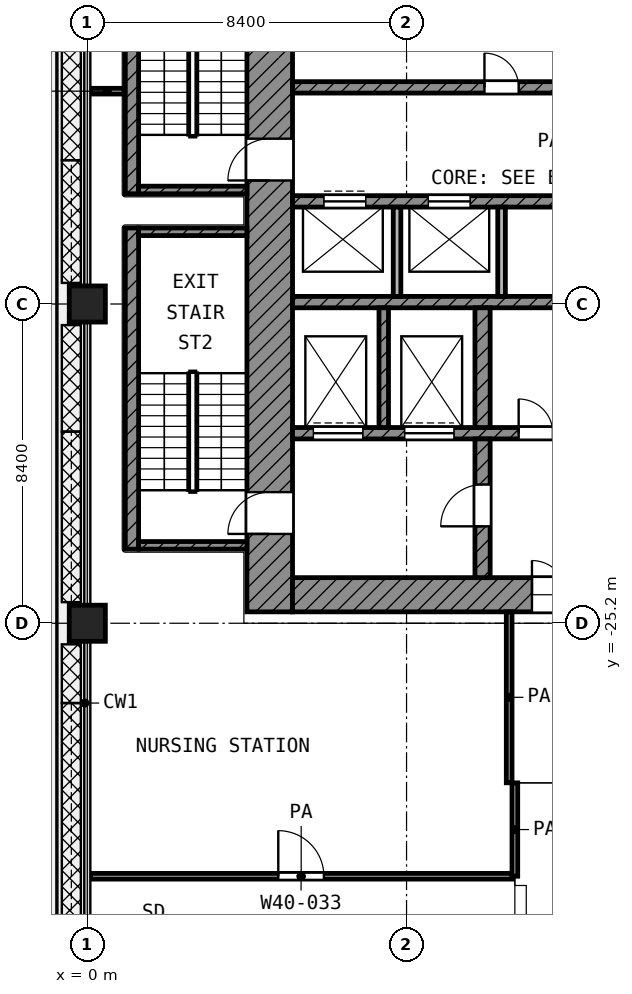
"""IFC4 building model, lengths in metres.
Left out: names, types, materials, properties, quantities, classifications, styles, units other than length and angle.
Written with IfcOpenShell. Run it as: python <this file> out.ifc"""

import sys

from ifc_helpers import new_model, si_unit, direction, frame, frame_2d, origin, origin_2d, place, context, subcontext, project, spatial, rectangle, extrude, element, fill, save


model = new_model("IFC4")
c1 = context("Model", 3, precision=1e-05, world=origin(), true_north=direction((0.0, 1.0)))
c2 = subcontext(c1, "Body", "Model", "MODEL_VIEW")
j1 = project(units=[si_unit("LENGTHUNIT", "METRE"), si_unit("PLANEANGLEUNIT", "RADIAN")], contexts=[c1])
p1 = place(None, origin())
s1 = spatial("IfcSite", under=j1, at=p1, CompositionType="ELEMENT")
p2 = place(p1, origin())
s2 = spatial("IfcBuilding", under=s1, at=p2, CompositionType="ELEMENT")
p3 = place(p2, frame((0.0, 0.0, 196.2)))
s3 = spatial("IfcBuildingStorey", under=s2, at=p3, CompositionType="ELEMENT", Elevation=196.2)
for number, where, z_axis, x_axis in (
    (1, (0.0, -16.8, 0.0), (0.0, 0.0, 1.0), (1.0, 0.0, 0.0)),
    (2, (0.0, -25.2, 0.0), (0.0, 0.0, 1.0), (1.0, 0.0, 0.0)),
):
    element("IfcColumn", number, at=place(p3, frame(where, z_axis=z_axis, x_axis=x_axis)), inside=s3, PredefinedType="COLUMN", context=c2, shape_type="SweptSolid", body=[
        extrude(rectangle(XDim=0.95, YDim=0.95, at=origin_2d()), origin(), (0.0, 0.0, 1.0), 4.2),
    ])
p4 = place(p3, frame((4.8, -24.9, 0.0), z_axis=(0.0, 0.0, 1.0), x_axis=(0.0, 1.0, 0.0)))
e3 = element("IfcWall", 3, at=p4, inside=s3, PredefinedType="SHEAR", context=c2, shape_type="SweptSolid", body=[
    extrude(rectangle(XDim=19.5, YDim=1.2, at=frame_2d((9.75, 0.0))), origin(), (0.0, 0.0, 1.0), 3.6),
])
p5 = place(p4, frame((11.35, 0.0, 0.0)))
e4 = element("IfcOpeningElement", 4, at=p5, cuts=e3, PredefinedType="OPENING", context=c2, shape_type="SweptSolid", body=[
    extrude(rectangle(XDim=1.1, YDim=2.1, at=frame_2d((0.55, 1.05))), frame((0.0, 0.61, 0.0), z_axis=(0.0, -1.0, 0.0), x_axis=(1.0, 0.0, 0.0)), (0.0, 0.0, 1.0), 1.22),
])
p6 = place(p4, frame((2.05, 0.0, 0.0)))
e5 = element("IfcOpeningElement", 5, at=p6, cuts=e3, PredefinedType="OPENING", context=c2, shape_type="SweptSolid", body=[
    extrude(rectangle(XDim=1.1, YDim=2.1, at=frame_2d((0.55, 1.05))), frame((0.0, 0.61, 0.0), z_axis=(0.0, -1.0, 0.0), x_axis=(1.0, 0.0, 0.0)), (0.0, 0.0, 1.0), 1.22),
])
p7 = place(p3, frame((5.4, -24.45, 0.0), z_axis=(0.0, 0.0, 1.0), x_axis=(1.0, 0.0, 0.0)))
e6 = element("IfcWall", 6, at=p7, inside=s3, PredefinedType="SHEAR", context=c2, shape_type="SweptSolid", body=[
    extrude(rectangle(XDim=18.6, YDim=0.9, at=frame_2d((9.3, 0.0))), origin(), (0.0, 0.0, 1.0), 3.6),
])
p8 = place(p7, frame((6.3, 0.0, 0.0)))
e7 = element("IfcOpeningElement", 7, at=p8, cuts=e6, PredefinedType="OPENING", context=c2, shape_type="SweptSolid", body=[
    extrude(rectangle(XDim=1.8, YDim=2.1, at=frame_2d((0.9, 1.05))), frame((0.0, 0.46, 0.0), z_axis=(0.0, -1.0, 0.0), x_axis=(1.0, 0.0, 0.0)), (0.0, 0.0, 1.0), 0.92),
])
p9 = place(p3, frame((5.4, -11.1, 0.0), z_axis=(0.0, 0.0, 1.0), x_axis=(1.0, 0.0, 0.0)))
e8 = element("IfcWall", 8, at=p9, inside=s3, PredefinedType="SHEAR", context=c2, shape_type="SweptSolid", body=[
    extrude(rectangle(XDim=16.65, YDim=0.3, at=frame_2d((8.325, 0.0))), origin(), (0.0, 0.0, 1.0), 3.6),
])
p10 = place(p9, frame((11.825, 0.0, 0.0)))
e9 = element("IfcOpeningElement", 9, at=p10, cuts=e8, PredefinedType="OPENING", context=c2, shape_type="SweptSolid", body=[
    extrude(rectangle(XDim=1.1, YDim=2.1, at=frame_2d((0.55, 1.05))), frame((0.0, 0.16, 0.0), z_axis=(0.0, -1.0, 0.0), x_axis=(1.0, 0.0, 0.0)), (0.0, 0.0, 1.0), 0.32),
])
p11 = place(p9, frame((14.575, 0.0, 0.0)))
e10 = element("IfcOpeningElement", 10, at=p11, cuts=e8, PredefinedType="OPENING", context=c2, shape_type="SweptSolid", body=[
    extrude(rectangle(XDim=1.1, YDim=2.1, at=frame_2d((0.55, 1.05))), frame((0.0, 0.16, 0.0), z_axis=(0.0, -1.0, 0.0), x_axis=(1.0, 0.0, 0.0)), (0.0, 0.0, 1.0), 0.32),
])
p12 = place(p9, frame((5.05, 0.0, 0.0)))
e11 = element("IfcOpeningElement", 11, at=p12, cuts=e8, PredefinedType="OPENING", context=c2, shape_type="SweptSolid", body=[
    extrude(rectangle(XDim=0.9, YDim=2.1, at=frame_2d((0.45, 1.05))), frame((0.0, 0.16, 0.0), z_axis=(0.0, -1.0, 0.0), x_axis=(1.0, 0.0, 0.0)), (0.0, 0.0, 1.0), 0.32),
])
p13 = place(p3, frame((5.4, -14.1, 0.0), z_axis=(0.0, 0.0, 1.0), x_axis=(1.0, 0.0, 0.0)))
e12 = element("IfcWall", 12, at=p13, inside=s3, PredefinedType="SHEAR", context=c2, shape_type="SweptSolid", body=[
    extrude(rectangle(XDim=16.65, YDim=0.3, at=frame_2d((8.325, 0.0))), origin(), (0.0, 0.0, 1.0), 3.6),
])
p14 = place(p13, frame((0.825, 0.0, 0.0)))
e13 = element("IfcOpeningElement", 13, at=p14, cuts=e12, PredefinedType="OPENING", context=c2, shape_type="SweptSolid", body=[
    extrude(rectangle(XDim=1.1, YDim=2.1, at=frame_2d((0.55, 1.05))), frame((0.0, 0.16, 0.0), z_axis=(0.0, -1.0, 0.0), x_axis=(1.0, 0.0, 0.0)), (0.0, 0.0, 1.0), 0.32),
])
p15 = place(p13, frame((3.575, 0.0, 0.0)))
e14 = element("IfcOpeningElement", 14, at=p15, cuts=e12, PredefinedType="OPENING", context=c2, shape_type="SweptSolid", body=[
    extrude(rectangle(XDim=1.1, YDim=2.1, at=frame_2d((0.55, 1.05))), frame((0.0, 0.16, 0.0), z_axis=(0.0, -1.0, 0.0), x_axis=(1.0, 0.0, 0.0)), (0.0, 0.0, 1.0), 0.32),
])
p16 = place(p3, frame((5.4, -16.75, 0.0), z_axis=(0.0, 0.0, 1.0), x_axis=(1.0, 0.0, 0.0)))
e15 = element("IfcWall", 15, at=p16, inside=s3, PredefinedType="SHEAR", context=c2, shape_type="SweptSolid", body=[
    extrude(rectangle(XDim=16.65, YDim=0.3, at=frame_2d((8.325, 0.0))), origin(), (0.0, 0.0, 1.0), 3.6),
])
p17 = place(p3, frame((5.4, -20.2, 0.0), z_axis=(0.0, 0.0, 1.0), x_axis=(1.0, 0.0, 0.0)))
e16 = element("IfcWall", 16, at=p17, inside=s3, PredefinedType="SHEAR", context=c2, shape_type="SweptSolid", body=[
    extrude(rectangle(XDim=14.65, YDim=0.3, at=frame_2d((7.325, 0.0))), origin(), (0.0, 0.0, 1.0), 3.6),
])
p18 = place(p17, frame((10.55, 0.0, 0.0)))
e17 = element("IfcOpeningElement", 17, at=p18, cuts=e16, PredefinedType="OPENING", context=c2, shape_type="SweptSolid", body=[
    extrude(rectangle(XDim=1.3, YDim=2.1, at=frame_2d((0.65, 1.05))), frame((0.0, 0.16, 0.0), z_axis=(0.0, -1.0, 0.0), x_axis=(1.0, 0.0, 0.0)), (0.0, 0.0, 1.0), 0.32),
])
p19 = place(p17, frame((12.95, 0.0, 0.0)))
e18 = element("IfcOpeningElement", 18, at=p19, cuts=e16, PredefinedType="OPENING", context=c2, shape_type="SweptSolid", body=[
    extrude(rectangle(XDim=1.3, YDim=2.1, at=frame_2d((0.65, 1.05))), frame((0.0, 0.16, 0.0), z_axis=(0.0, -1.0, 0.0), x_axis=(1.0, 0.0, 0.0)), (0.0, 0.0, 1.0), 0.32),
])
p20 = place(p17, frame((0.55, 0.0, 0.0)))
e19 = element("IfcOpeningElement", 19, at=p20, cuts=e16, PredefinedType="OPENING", context=c2, shape_type="SweptSolid", body=[
    extrude(rectangle(XDim=1.3, YDim=2.1, at=frame_2d((0.65, 1.05))), frame((0.0, 0.16, 0.0), z_axis=(0.0, -1.0, 0.0), x_axis=(1.0, 0.0, 0.0)), (0.0, 0.0, 1.0), 0.32),
])
p21 = place(p17, frame((2.95, 0.0, 0.0)))
e20 = element("IfcOpeningElement", 20, at=p21, cuts=e16, PredefinedType="OPENING", context=c2, shape_type="SweptSolid", body=[
    extrude(rectangle(XDim=1.3, YDim=2.1, at=frame_2d((0.65, 1.05))), frame((0.0, 0.16, 0.0), z_axis=(0.0, -1.0, 0.0), x_axis=(1.0, 0.0, 0.0)), (0.0, 0.0, 1.0), 0.32),
])
p22 = place(p17, frame((5.95, 0.0, 0.0)))
e21 = element("IfcOpeningElement", 21, at=p22, cuts=e16, PredefinedType="OPENING", context=c2, shape_type="SweptSolid", body=[
    extrude(rectangle(XDim=0.9, YDim=2.1, at=frame_2d((0.45, 1.05))), frame((0.0, 0.16, 0.0), z_axis=(0.0, -1.0, 0.0), x_axis=(1.0, 0.0, 0.0)), (0.0, 0.0, 1.0), 0.32),
])
p23 = place(p17, frame((8.35, 0.0, 0.0)))
e22 = element("IfcOpeningElement", 22, at=p23, cuts=e16, PredefinedType="OPENING", context=c2, shape_type="SweptSolid", body=[
    extrude(rectangle(XDim=0.9, YDim=2.1, at=frame_2d((0.45, 1.05))), frame((0.0, 0.16, 0.0), z_axis=(0.0, -1.0, 0.0), x_axis=(1.0, 0.0, 0.0)), (0.0, 0.0, 1.0), 0.32),
])
p24 = place(p3, frame((10.4, -24.0, 0.0), z_axis=(0.0, 0.0, 1.0), x_axis=(0.0, 1.0, 0.0)))
e23 = element("IfcWall", 23, at=p24, inside=s3, PredefinedType="SHEAR", context=c2, shape_type="SweptSolid", body=[
    extrude(rectangle(XDim=3.65, YDim=0.4, at=frame_2d((1.825, 0.0))), origin(), (0.0, 0.0, 1.0), 3.6),
])
p25 = place(p24, frame((1.35, 0.0, 0.0)))
e24 = element("IfcOpeningElement", 24, at=p25, cuts=e23, PredefinedType="OPENING", context=c2, shape_type="SweptSolid", body=[
    extrude(rectangle(XDim=1.1, YDim=2.1, at=frame_2d((0.55, 1.05))), frame((0.0, 0.21, 0.0), z_axis=(0.0, -1.0, 0.0), x_axis=(1.0, 0.0, 0.0)), (0.0, 0.0, 1.0), 0.42),
])
p26 = place(p3, frame((10.4, -20.05, 0.0), z_axis=(0.0, 0.0, 1.0), x_axis=(0.0, 1.0, 0.0)))
e25 = element("IfcWall", 25, at=p26, inside=s3, PredefinedType="SHEAR", context=c2, shape_type="SweptSolid", body=[
    extrude(rectangle(XDim=3.15, YDim=0.4, at=frame_2d((1.575, 0.0))), origin(), (0.0, 0.0, 1.0), 3.6),
])
p27 = place(p3, frame((7.8, -20.05, 0.0), z_axis=(0.0, 0.0, 1.0), x_axis=(0.0, 1.0, 0.0)))
e26 = element("IfcWall", 26, at=p27, inside=s3, PredefinedType="SHEAR", context=c2, shape_type="SweptSolid", body=[
    extrude(rectangle(XDim=3.15, YDim=0.25, at=frame_2d((1.575, 0.0))), origin(), (0.0, 0.0, 1.0), 3.6),
])
for number, where, z_axis, x_axis in (
    (27, (8.15, -16.6, 0.0), (0.0, 0.0, 1.0), (0.0, 1.0, 0.0)),
    (28, (10.9, -16.6, 0.0), (0.0, 0.0, 1.0), (0.0, 1.0, 0.0)),
):
    element("IfcWall", number, at=place(p3, frame(where, z_axis=z_axis, x_axis=x_axis)), inside=s3, PredefinedType="PARTITIONING", context=c2, shape_type="SweptSolid", body=[
        extrude(rectangle(XDim=2.35, YDim=0.2, at=frame_2d((1.175, 0.0))), origin(), (0.0, 0.0, 1.0), 3.6),
    ])
p28 = place(p3, frame((1.175, -13.9, 0.0), z_axis=(0.0, 0.0, 1.0), x_axis=(0.0, 1.0, 0.0)))
e29 = element("IfcWall", 29, at=p28, inside=s3, PredefinedType="SHEAR", context=c2, shape_type="SweptSolid", body=[
    extrude(rectangle(XDim=8.45, YDim=0.35, at=frame_2d((4.225, 0.0))), origin(), (0.0, 0.0, 1.0), 3.6),
])
p29 = place(p3, frame((1.35, -13.8, 0.0), z_axis=(0.0, 0.0, 1.0), x_axis=(1.0, 0.0, 0.0)))
e30 = element("IfcWall", 30, at=p29, inside=s3, PredefinedType="SHEAR", context=c2, shape_type="SweptSolid", body=[
    extrude(rectangle(XDim=2.85, YDim=0.2, at=frame_2d((1.425, 0.0))), origin(), (0.0, 0.0, 1.0), 3.6),
])
p30 = place(p3, frame((1.175, -23.25, 0.0), z_axis=(0.0, 0.0, 1.0), x_axis=(0.0, 1.0, 0.0)))
e31 = element("IfcWall", 31, at=p30, inside=s3, PredefinedType="SHEAR", context=c2, shape_type="SweptSolid", body=[
    extrude(rectangle(XDim=8.45, YDim=0.35, at=frame_2d((4.225, 0.0))), origin(), (0.0, 0.0, 1.0), 3.6),
])
for number, where, z_axis, x_axis in (
    (32, (1.35, -14.9, 0.0), (0.0, 0.0, 1.0), (1.0, 0.0, 0.0)),
    (33, (1.35, -23.15, 0.0), (0.0, 0.0, 1.0), (1.0, 0.0, 0.0)),
):
    element("IfcWall", number, at=place(p3, frame(where, z_axis=z_axis, x_axis=x_axis)), inside=s3, PredefinedType="SHEAR", context=c2, shape_type="SweptSolid", body=[
        extrude(rectangle(XDim=2.85, YDim=0.2, at=frame_2d((1.425, 0.0))), origin(), (0.0, 0.0, 1.0), 3.6),
    ])
p31 = place(p3, frame((0.08, -31.857, 0.0), z_axis=(0.0, 0.0, 1.0), x_axis=(1.0, 0.0, 0.0)))
e34 = element("IfcWall", 34, at=p31, inside=s3, PredefinedType="PARTITIONING", context=c2, shape_type="SweptSolid", body=[
    extrude(rectangle(XDim=11.095, YDim=0.15, at=frame_2d((5.547, 0.0))), origin(), (0.0, 0.0, 1.0), 3.6),
])
p32 = place(p31, frame((4.945, 0.0, 0.0)))
e35 = element("IfcOpeningElement", 35, at=p32, cuts=e34, PredefinedType="OPENING", context=c2, shape_type="SweptSolid", body=[
    extrude(rectangle(XDim=1.2, YDim=2.1, at=frame_2d((0.6, 1.05))), frame((0.0, 0.085, 0.0), z_axis=(0.0, -1.0, 0.0), x_axis=(1.0, 0.0, 0.0)), (0.0, 0.0, 1.0), 0.17),
])
p33 = place(p3, frame((0.08, -11.2, 0.0), z_axis=(0.0, 0.0, 1.0), x_axis=(1.0, 0.0, 0.0)))
e36 = element("IfcWall", 36, at=p33, inside=s3, PredefinedType="PARTITIONING", context=c2, shape_type="SweptSolid", body=[
    extrude(rectangle(XDim=0.89, YDim=0.15, at=frame_2d((0.445, 0.0))), origin(), (0.0, 0.0, 1.0), 3.6),
])
p34 = place(p3, frame((11.1, -29.398, 0.0), z_axis=(0.0, 0.0, 1.0), x_axis=(0.0, 1.0, 0.0)))
e37 = element("IfcWall", 37, at=p34, inside=s3, PredefinedType="PARTITIONING", context=c2, shape_type="SweptSolid", body=[
    extrude(rectangle(XDim=4.498, YDim=0.15, at=frame_2d((2.249, 0.0))), origin(), (0.0, 0.0, 1.0), 3.6),
])
p35 = place(p3, frame((11.25, -31.857, 0.0), z_axis=(0.0, 0.0, 1.0), x_axis=(0.0, 1.0, 0.0)))
e38 = element("IfcWall", 38, at=p35, inside=s3, PredefinedType="PARTITIONING", context=c2, shape_type="SweptSolid", body=[
    extrude(rectangle(XDim=2.457, YDim=0.15, at=frame_2d((1.229, 0.0))), origin(), (0.0, 0.0, 1.0), 3.6),
])
p36 = place(p14, origin())
e39 = element("IfcDoor", 39, at=p36, inside=s3, OperationType="DOUBLE_DOOR_SLIDING", PredefinedType="DOOR", context=c2, shape_type="SweptSolid", body=[
    extrude(rectangle(XDim=1.1, YDim=2.1, at=frame_2d((0.55, 1.05))), frame((0.0, 0.025, 0.0), z_axis=(0.0, -1.0, 0.0), x_axis=(1.0, 0.0, 0.0)), (0.0, 0.0, 1.0), 0.05),
])
fill(e13, e39)
p37 = place(p15, origin())
e40 = element("IfcDoor", 40, at=p37, inside=s3, OperationType="DOUBLE_DOOR_SLIDING", PredefinedType="DOOR", context=c2, shape_type="SweptSolid", body=[
    extrude(rectangle(XDim=1.1, YDim=2.1, at=frame_2d((0.55, 1.05))), frame((0.0, 0.025, 0.0), z_axis=(0.0, -1.0, 0.0), x_axis=(1.0, 0.0, 0.0)), (0.0, 0.0, 1.0), 0.05),
])
fill(e14, e40)
p38 = place(p20, origin())
e41 = element("IfcDoor", 41, at=p38, inside=s3, OperationType="DOUBLE_DOOR_SLIDING", PredefinedType="DOOR", context=c2, shape_type="SweptSolid", body=[
    extrude(rectangle(XDim=1.3, YDim=2.1, at=frame_2d((0.65, 1.05))), frame((0.0, 0.025, 0.0), z_axis=(0.0, -1.0, 0.0), x_axis=(1.0, 0.0, 0.0)), (0.0, 0.0, 1.0), 0.05),
])
fill(e19, e41)
p39 = place(p21, origin())
e42 = element("IfcDoor", 42, at=p39, inside=s3, OperationType="DOUBLE_DOOR_SLIDING", PredefinedType="DOOR", context=c2, shape_type="SweptSolid", body=[
    extrude(rectangle(XDim=1.3, YDim=2.1, at=frame_2d((0.65, 1.05))), frame((0.0, 0.025, 0.0), z_axis=(0.0, -1.0, 0.0), x_axis=(1.0, 0.0, 0.0)), (0.0, 0.0, 1.0), 0.05),
])
fill(e20, e42)
p40 = place(p5, origin())
e43 = element("IfcDoor", 43, at=p40, inside=s3, OperationType="SINGLE_SWING_LEFT", PredefinedType="DOOR", context=c2, shape_type="SweptSolid", body=[
    extrude(rectangle(XDim=1.1, YDim=2.1, at=frame_2d((0.55, 1.05))), frame((0.0, 0.025, 0.0), z_axis=(0.0, -1.0, 0.0), x_axis=(1.0, 0.0, 0.0)), (0.0, 0.0, 1.0), 0.05),
])
fill(e4, e43)
p41 = place(p6, origin())
e44 = element("IfcDoor", 44, at=p41, inside=s3, OperationType="SINGLE_SWING_LEFT", PredefinedType="DOOR", context=c2, shape_type="SweptSolid", body=[
    extrude(rectangle(XDim=1.1, YDim=2.1, at=frame_2d((0.55, 1.05))), frame((0.0, 0.025, 0.0), z_axis=(0.0, -1.0, 0.0), x_axis=(1.0, 0.0, 0.0)), (0.0, 0.0, 1.0), 0.05),
])
fill(e5, e44)
p42 = place(p25, origin())
e45 = element("IfcDoor", 45, at=p42, inside=s3, OperationType="SINGLE_SWING_LEFT", PredefinedType="DOOR", context=c2, shape_type="SweptSolid", body=[
    extrude(rectangle(XDim=1.1, YDim=2.1, at=frame_2d((0.55, 1.05))), frame((0.0, 0.025, 0.0), z_axis=(0.0, -1.0, 0.0), x_axis=(1.0, 0.0, 0.0)), (0.0, 0.0, 1.0), 0.05),
])
fill(e24, e45)
p43 = place(p8, origin())
e46 = element("IfcDoor", 46, at=p43, inside=s3, OperationType="DOUBLE_DOOR_SINGLE_SWING", PredefinedType="DOOR", context=c2, shape_type="SweptSolid", body=[
    extrude(rectangle(XDim=1.8, YDim=2.1, at=frame_2d((0.9, 1.05))), frame((0.0, 0.025, 0.0), z_axis=(0.0, -1.0, 0.0), x_axis=(1.0, 0.0, 0.0)), (0.0, 0.0, 1.0), 0.05),
])
fill(e7, e46)
p44 = place(p22, origin())
e47 = element("IfcDoor", 47, at=p44, inside=s3, OperationType="SINGLE_SWING_LEFT", PredefinedType="DOOR", context=c2, shape_type="SweptSolid", body=[
    extrude(rectangle(XDim=0.9, YDim=2.1, at=frame_2d((0.45, 1.05))), frame((0.0, 0.025, 0.0), z_axis=(0.0, -1.0, 0.0), x_axis=(1.0, 0.0, 0.0)), (0.0, 0.0, 1.0), 0.05),
])
fill(e21, e47)
p45 = place(p12, origin())
e48 = element("IfcDoor", 48, at=p45, inside=s3, OperationType="SINGLE_SWING_LEFT", PredefinedType="DOOR", context=c2, shape_type="SweptSolid", body=[
    extrude(rectangle(XDim=0.9, YDim=2.1, at=frame_2d((0.45, 1.05))), frame((0.0, 0.025, 0.0), z_axis=(0.0, -1.0, 0.0), x_axis=(1.0, 0.0, 0.0)), (0.0, 0.0, 1.0), 0.05),
])
fill(e11, e48)
p46 = place(p32, origin())
e49 = element("IfcDoor", 49, at=p46, inside=s3, OperationType="SINGLE_SWING_LEFT", PredefinedType="DOOR", context=c2, shape_type="SweptSolid", body=[
    extrude(rectangle(XDim=1.2, YDim=2.1, at=frame_2d((0.6, 1.05))), frame((0.0, 0.025, 0.0), z_axis=(0.0, -1.0, 0.0), x_axis=(1.0, 0.0, 0.0)), (0.0, 0.0, 1.0), 0.05),
])
fill(e35, e49)
save(model, sys.argv[1])
